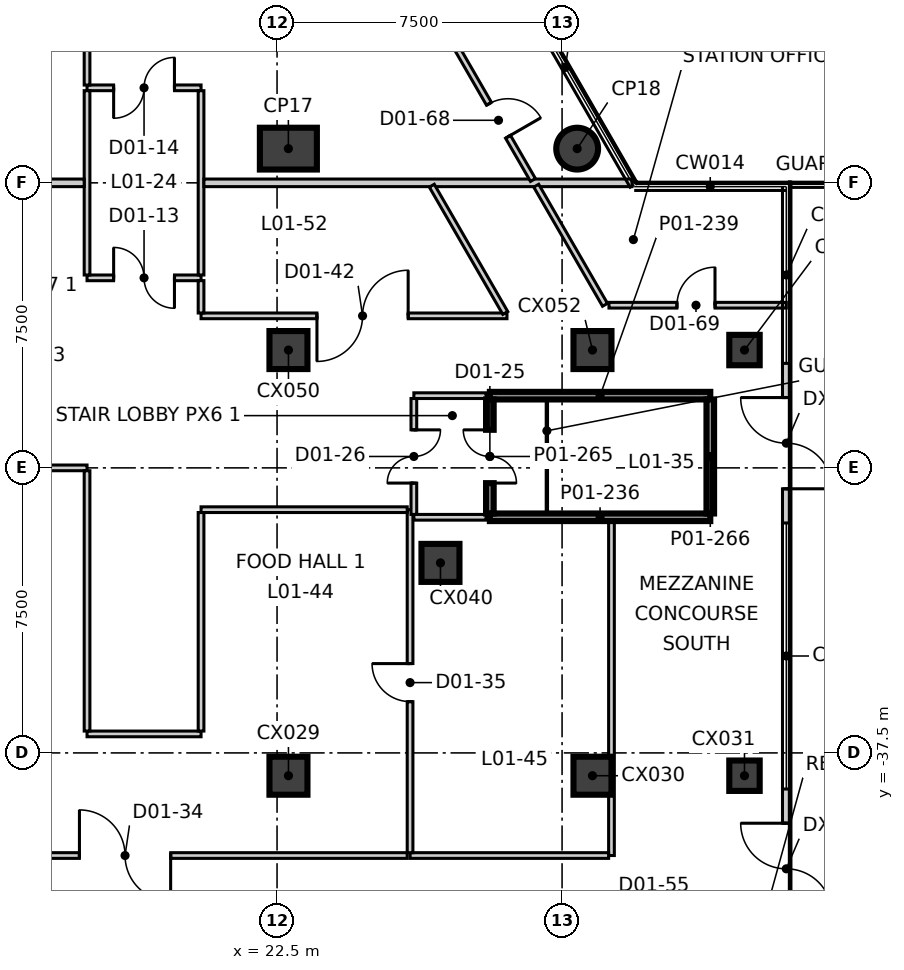
"""IFC4 building model, lengths in metres.
Left out: names, types, materials, properties, quantities, classifications, styles, units other than length and angle.
Written with IfcOpenShell. Run it as: python <this file> out.ifc"""

import sys

from ifc_helpers import new_model, si_unit, direction, frame, frame_2d, origin, origin_2d, place, context, subcontext, project, spatial, rectangle, circle, extrude, element, fill, save


model = new_model("IFC4")
c1 = context("Model", 3, precision=1e-05, world=origin(), true_north=direction((0.0, 1.0)))
c2 = subcontext(c1, "Body", "Model", "MODEL_VIEW")
j1 = project(units=[si_unit("LENGTHUNIT", "METRE"), si_unit("PLANEANGLEUNIT", "RADIAN")], contexts=[c1])
p1 = place(None, origin())
s1 = spatial("IfcSite", under=j1, at=p1, CompositionType="ELEMENT")
p2 = place(p1, origin())
s2 = spatial("IfcBuilding", under=s1, at=p2, CompositionType="ELEMENT")
p3 = place(p2, frame((0.0, 0.0, 8.5)))
s3 = spatial("IfcBuildingStorey", under=s2, at=p3, CompositionType="ELEMENT", Elevation=8.5)
p4 = place(p3, frame((22.798, -21.6, -0.4), z_axis=(0.0, 0.0, 1.0), x_axis=(1.0, 0.0, 0.0)))
e1 = element("IfcColumn", 1, at=p4, inside=s3, PredefinedType="COLUMN", context=c2, shape_type="SweptSolid", body=[
    extrude(rectangle(XDim=1.5, YDim=1.1, at=origin_2d()), origin(), (0.0, 0.0, 1.0), 6.0),
])
p5 = place(p3, frame((30.397, -21.6, -0.4), z_axis=(0.0, 0.0, 1.0), x_axis=(1.0, 0.0, 0.0)))
e2 = element("IfcColumn", 2, at=p5, inside=s3, PredefinedType="COLUMN", context=c2, shape_type="SweptSolid", body=[
    extrude(circle(Radius=0.55, at=origin_2d()), origin(), (0.0, 0.0, 1.0), 6.0),
])
for number, where, z_axis, x_axis in (
    (3, (22.8, -38.1, -0.4), (0.0, 0.0, 1.0), (1.0, 0.0, 0.0)),
    (4, (30.8, -38.1, -0.4), (0.0, 0.0, 1.0), (1.0, 0.0, 0.0)),
):
    element("IfcColumn", number, at=place(p3, frame(where, z_axis=z_axis, x_axis=x_axis)), inside=s3, PredefinedType="COLUMN", context=c2, shape_type="SweptSolid", body=[
        extrude(rectangle(XDim=1.0, YDim=1.0, at=origin_2d()), origin(), (0.0, 0.0, 1.0), 6.0),
    ])
p6 = place(p3, frame((34.8, -38.1, -0.4), z_axis=(0.0, 0.0, 1.0), x_axis=(1.0, 0.0, 0.0)))
e5 = element("IfcColumn", 5, at=p6, inside=s3, PredefinedType="COLUMN", context=c2, shape_type="SweptSolid", body=[
    extrude(rectangle(XDim=0.8, YDim=0.8, at=origin_2d()), origin(), (0.0, 0.0, 1.0), 6.0),
])
for number, where, z_axis, x_axis in (
    (6, (26.8, -32.5, -0.4), (0.0, 0.0, 1.0), (1.0, 0.0, 0.0)),
    (7, (22.8, -26.9, -0.4), (0.0, 0.0, 1.0), (1.0, 0.0, 0.0)),
    (8, (30.8, -26.9, -0.4), (0.0, 0.0, 1.0), (1.0, 0.0, 0.0)),
):
    element("IfcColumn", number, at=place(p3, frame(where, z_axis=z_axis, x_axis=x_axis)), inside=s3, PredefinedType="COLUMN", context=c2, shape_type="SweptSolid", body=[
        extrude(rectangle(XDim=1.0, YDim=1.0, at=origin_2d()), origin(), (0.0, 0.0, 1.0), 6.0),
    ])
p7 = place(p3, frame((34.8, -26.9, -0.4), z_axis=(0.0, 0.0, 1.0), x_axis=(1.0, 0.0, 0.0)))
e9 = element("IfcColumn", 9, at=p7, inside=s3, PredefinedType="COLUMN", context=c2, shape_type="SweptSolid", body=[
    extrude(rectangle(XDim=0.8, YDim=0.8, at=origin_2d()), origin(), (0.0, 0.0, 1.0), 6.0),
])
p8 = place(p3, frame((35.9, -42.65, 0.0), z_axis=(0.0, 0.0, 1.0), x_axis=(0.0, 1.0, 0.0)))
e10 = element("IfcWall", 10, at=p8, inside=s3, PredefinedType="ELEMENTEDWALL", context=c2, shape_type="SweptSolid", body=[
    extrude(rectangle(XDim=4.2, YDim=0.2, at=frame_2d((2.1, 0.0))), origin(), (0.0, 0.0, 1.0), 5.6),
])
p9 = place(p8, frame((0.9, 0.0, 0.0)))
e11 = element("IfcOpeningElement", 11, at=p9, cuts=e10, PredefinedType="OPENING", context=c2, shape_type="SweptSolid", body=[
    extrude(rectangle(XDim=2.4, YDim=2.4, at=frame_2d((1.2, 1.2))), frame((0.0, 0.11, 0.0), z_axis=(0.0, -1.0, 0.0), x_axis=(1.0, 0.0, 0.0)), (0.0, 0.0, 1.0), 0.22),
])
p10 = place(p3, frame((35.9, -31.45, 0.0), z_axis=(0.0, 0.0, 1.0), x_axis=(0.0, 1.0, 0.0)))
e12 = element("IfcWall", 12, at=p10, inside=s3, PredefinedType="ELEMENTEDWALL", context=c2, shape_type="SweptSolid", body=[
    extrude(rectangle(XDim=4.2, YDim=0.2, at=frame_2d((2.1, 0.0))), origin(), (0.0, 0.0, 1.0), 5.6),
])
p11 = place(p10, frame((0.9, 0.0, 0.0)))
e13 = element("IfcOpeningElement", 13, at=p11, cuts=e12, PredefinedType="OPENING", context=c2, shape_type="SweptSolid", body=[
    extrude(rectangle(XDim=2.4, YDim=2.4, at=frame_2d((1.2, 1.2))), frame((0.0, 0.11, 0.0), z_axis=(0.0, -1.0, 0.0), x_axis=(1.0, 0.0, 0.0)), (0.0, 0.0, 1.0), 0.22),
])
for number, where, z_axis, x_axis in (
    (14, (26.1, -28.1, 0.0), (0.0, 0.0, 1.0), (1.0, 0.0, 0.0)),
    (15, (26.1, -31.3, 0.0), (0.0, 0.0, 1.0), (1.0, 0.0, 0.0)),
):
    element("IfcWall", number, at=place(p3, frame(where, z_axis=z_axis, x_axis=x_axis)), inside=s3, PredefinedType="PARTITIONING", context=c2, shape_type="SweptSolid", body=[
        extrude(rectangle(XDim=1.9, YDim=0.15, at=frame_2d((0.95, 0.0))), origin(), (0.0, 0.0, 1.0), 5.6),
    ])
p12 = place(p3, frame((31.3, -40.2, 0.0), z_axis=(0.0, 0.0, 1.0), x_axis=(0.0, 1.0, 0.0)))
e16 = element("IfcWall", 16, at=p12, inside=s3, PredefinedType="PARTITIONING", context=c2, shape_type="SweptSolid", body=[
    extrude(rectangle(XDim=8.8, YDim=0.15, at=frame_2d((4.4, 0.0))), origin(), (0.0, 0.0, 1.0), 5.6),
])
p13 = place(p3, frame((26.0, -40.2, 0.0), z_axis=(0.0, 0.0, 1.0), x_axis=(1.0, 0.0, 0.0)))
e17 = element("IfcWall", 17, at=p13, inside=s3, PredefinedType="PARTITIONING", context=c2, shape_type="SweptSolid", body=[
    extrude(rectangle(XDim=5.225, YDim=0.15, at=frame_2d((2.613, 0.0))), origin(), (0.0, 0.0, 1.0), 5.6),
])
p14 = place(p3, frame((26.0, -40.125, 0.0), z_axis=(0.0, 0.0, 1.0), x_axis=(0.0, 1.0, 0.0)))
e18 = element("IfcWall", 18, at=p14, inside=s3, PredefinedType="PARTITIONING", context=c2, shape_type="SweptSolid", body=[
    extrude(rectangle(XDim=9.025, YDim=0.15, at=frame_2d((4.512, 0.0))), origin(), (0.0, 0.0, 1.0), 5.6),
])
p15 = place(p14, frame((3.975, 0.0, 0.0)))
e19 = element("IfcOpeningElement", 19, at=p15, cuts=e18, PredefinedType="OPENING", context=c2, shape_type="SweptSolid", body=[
    extrude(rectangle(XDim=1.0, YDim=2.1, at=frame_2d((0.5, 1.05))), frame((0.0, 0.085, 0.0), z_axis=(0.0, -1.0, 0.0), x_axis=(1.0, 0.0, 0.0)), (0.0, 0.0, 1.0), 0.17),
])
p16 = place(p3, frame((26.1, -31.225, 0.0), z_axis=(0.0, 0.0, 1.0), x_axis=(0.0, 1.0, 0.0)))
e20 = element("IfcWall", 20, at=p16, inside=s3, PredefinedType="PARTITIONING", context=c2, shape_type="SweptSolid", body=[
    extrude(rectangle(XDim=3.05, YDim=0.15, at=frame_2d((1.525, 0.0))), origin(), (0.0, 0.0, 1.0), 5.6),
])
p17 = place(p16, frame((0.825, 0.0, 0.0)))
e21 = element("IfcOpeningElement", 21, at=p17, cuts=e20, PredefinedType="OPENING", context=c2, shape_type="SweptSolid", body=[
    extrude(rectangle(XDim=1.4, YDim=2.1, at=frame_2d((0.7, 1.05))), frame((0.0, 0.085, 0.0), z_axis=(0.0, -1.0, 0.0), x_axis=(1.0, 0.0, 0.0)), (0.0, 0.0, 1.0), 0.17),
])
p18 = place(p3, frame((17.5, -20.0, 0.0), z_axis=(0.0, 0.0, 1.0), x_axis=(1.0, 0.0, 0.0)))
e22 = element("IfcWall", 22, at=p18, inside=s3, PredefinedType="PARTITIONING", context=c2, shape_type="SweptSolid", body=[
    extrude(rectangle(XDim=3.0, YDim=0.15, at=frame_2d((1.5, 0.0))), origin(), (0.0, 0.0, 1.0), 5.6),
])
p19 = place(p18, frame((0.7, 0.0, 0.0)))
e23 = element("IfcOpeningElement", 23, at=p19, cuts=e22, PredefinedType="OPENING", context=c2, shape_type="SweptSolid", body=[
    extrude(rectangle(XDim=1.6, YDim=2.1, at=frame_2d((0.8, 1.05))), frame((0.0, 0.085, 0.0), z_axis=(0.0, -1.0, 0.0), x_axis=(1.0, 0.0, 0.0)), (0.0, 0.0, 1.0), 0.17),
])
p20 = place(p3, frame((17.5, -25.0, 0.0), z_axis=(0.0, 0.0, 1.0), x_axis=(1.0, 0.0, 0.0)))
e24 = element("IfcWall", 24, at=p20, inside=s3, PredefinedType="PARTITIONING", context=c2, shape_type="SweptSolid", body=[
    extrude(rectangle(XDim=3.0, YDim=0.15, at=frame_2d((1.5, 0.0))), origin(), (0.0, 0.0, 1.0), 5.6),
])
p21 = place(p20, frame((0.7, 0.0, 0.0)))
e25 = element("IfcOpeningElement", 25, at=p21, cuts=e24, PredefinedType="OPENING", context=c2, shape_type="SweptSolid", body=[
    extrude(rectangle(XDim=1.6, YDim=2.1, at=frame_2d((0.8, 1.05))), frame((0.0, 0.085, 0.0), z_axis=(0.0, -1.0, 0.0), x_axis=(1.0, 0.0, 0.0)), (0.0, 0.0, 1.0), 0.17),
])
for number, where, z_axis, x_axis in (
    (26, (17.5, -24.925, 0.0), (0.0, 0.0, 1.0), (0.0, 1.0, 0.0)),
    (27, (20.5, -24.925, 0.0), (0.0, 0.0, 1.0), (0.0, 1.0, 0.0)),
):
    element("IfcWall", number, at=place(p3, frame(where, z_axis=z_axis, x_axis=x_axis)), inside=s3, PredefinedType="PARTITIONING", context=c2, shape_type="SweptSolid", body=[
        extrude(rectangle(XDim=4.85, YDim=0.15, at=frame_2d((2.425, 0.0))), origin(), (0.0, 0.0, 1.0), 5.6),
    ])
p22 = place(p3, frame((-17.425, -22.5, 0.0), z_axis=(0.0, 0.0, 1.0), x_axis=(1.0, 0.0, 0.0)))
e28 = element("IfcWall", 28, at=p22, inside=s3, PredefinedType="SOLIDWALL", context=c2, shape_type="SweptSolid", body=[
    extrude(rectangle(XDim=34.85, YDim=0.2, at=frame_2d((17.425, 0.0))), origin(), (0.0, 0.0, 1.0), 5.6),
])
p23 = place(p3, frame((20.575, -22.5, 0.0), z_axis=(0.0, 0.0, 1.0), x_axis=(1.0, 0.0, 0.0)))
e29 = element("IfcWall", 29, at=p23, inside=s3, PredefinedType="SOLIDWALL", context=c2, shape_type="SweptSolid", body=[
    extrude(rectangle(XDim=11.266, YDim=0.2, at=frame_2d((5.633, 0.0))), origin(), (0.0, 0.0, 1.0), 5.6),
])
p24 = place(p3, frame((11.0, -40.2, 0.0), z_axis=(0.0, 0.0, 1.0), x_axis=(1.0, 0.0, 0.0)))
e30 = element("IfcWall", 30, at=p24, inside=s3, PredefinedType="PARTITIONING", context=c2, shape_type="SweptSolid", body=[
    extrude(rectangle(XDim=14.925, YDim=0.15, at=frame_2d((7.462, 0.0))), origin(), (0.0, 0.0, 1.0), 5.6),
])
p25 = place(p24, frame((6.3, 0.0, 0.0)))
e31 = element("IfcOpeningElement", 31, at=p25, cuts=e30, PredefinedType="OPENING", context=c2, shape_type="SweptSolid", body=[
    extrude(rectangle(XDim=2.4, YDim=2.1, at=frame_2d((1.2, 1.05))), frame((0.0, 0.085, 0.0), z_axis=(0.0, -1.0, 0.0), x_axis=(1.0, 0.0, 0.0)), (0.0, 0.0, 1.0), 0.17),
])
p26 = place(p3, frame((20.5, -26.0, 0.0), z_axis=(0.0, 0.0, 1.0), x_axis=(1.0, 0.0, 0.0)))
e32 = element("IfcWall", 32, at=p26, inside=s3, PredefinedType="PARTITIONING", context=c2, shape_type="SweptSolid", body=[
    extrude(rectangle(XDim=8.05, YDim=0.15, at=frame_2d((4.025, 0.0))), origin(), (0.0, 0.0, 1.0), 5.6),
])
p27 = place(p26, frame((3.05, 0.0, 0.0)))
e33 = element("IfcOpeningElement", 33, at=p27, cuts=e32, PredefinedType="OPENING", context=c2, shape_type="SweptSolid", body=[
    extrude(rectangle(XDim=2.4, YDim=2.1, at=frame_2d((1.2, 1.05))), frame((0.0, 0.085, 0.0), z_axis=(0.0, -1.0, 0.0), x_axis=(1.0, 0.0, 0.0)), (0.0, 0.0, 1.0), 0.17),
])
p28 = place(p3, frame((20.5, -31.1, 0.0), z_axis=(0.0, 0.0, 1.0), x_axis=(1.0, 0.0, 0.0)))
e34 = element("IfcWall", 34, at=p28, inside=s3, PredefinedType="PARTITIONING", context=c2, shape_type="SweptSolid", body=[
    extrude(rectangle(XDim=5.425, YDim=0.15, at=frame_2d((2.712, 0.0))), origin(), (0.0, 0.0, 1.0), 5.6),
])
p29 = place(p3, frame((17.5, -37.0, 0.0), z_axis=(0.0, 0.0, 1.0), x_axis=(1.0, 0.0, 0.0)))
e35 = element("IfcWall", 35, at=p29, inside=s3, PredefinedType="PARTITIONING", context=c2, shape_type="SweptSolid", body=[
    extrude(rectangle(XDim=3.0, YDim=0.15, at=frame_2d((1.5, 0.0))), origin(), (0.0, 0.0, 1.0), 5.6),
])
p30 = place(p3, frame((11.0, -30.0, 0.0), z_axis=(0.0, 0.0, 1.0), x_axis=(1.0, 0.0, 0.0)))
e36 = element("IfcWall", 36, at=p30, inside=s3, PredefinedType="PARTITIONING", context=c2, shape_type="SweptSolid", body=[
    extrude(rectangle(XDim=6.5, YDim=0.15, at=frame_2d((3.25, 0.0))), origin(), (0.0, 0.0, 1.0), 5.6),
])
p31 = place(p3, frame((17.5, -36.925, 0.0), z_axis=(0.0, 0.0, 1.0), x_axis=(0.0, 1.0, 0.0)))
e37 = element("IfcWall", 37, at=p31, inside=s3, PredefinedType="PARTITIONING", context=c2, shape_type="SweptSolid", body=[
    extrude(rectangle(XDim=6.85, YDim=0.15, at=frame_2d((3.425, 0.0))), origin(), (0.0, 0.0, 1.0), 5.6),
])
p32 = place(p3, frame((17.5, -19.927, 0.0), z_axis=(0.0, 0.0, 1.0), x_axis=(0.0, 1.0, 0.0)))
e38 = element("IfcWall", 38, at=p32, inside=s3, PredefinedType="PARTITIONING", context=c2, shape_type="SweptSolid", body=[
    extrude(rectangle(XDim=1.727, YDim=0.15, at=frame_2d((0.864, 0.0))), origin(), (0.0, 0.0, 1.0), 5.6),
])
p33 = place(p3, frame((20.5, -36.925, 0.0), z_axis=(0.0, 0.0, 1.0), x_axis=(0.0, 1.0, 0.0)))
e39 = element("IfcWall", 39, at=p33, inside=s3, PredefinedType="PARTITIONING", context=c2, shape_type="SweptSolid", body=[
    extrude(rectangle(XDim=5.75, YDim=0.15, at=frame_2d((2.875, 0.0))), origin(), (0.0, 0.0, 1.0), 5.6),
])
p34 = place(p3, frame((20.5, -25.925, 0.0), z_axis=(0.0, 0.0, 1.0), x_axis=(0.0, 1.0, 0.0)))
e40 = element("IfcWall", 40, at=p34, inside=s3, PredefinedType="PARTITIONING", context=c2, shape_type="SweptSolid", body=[
    extrude(rectangle(XDim=0.852, YDim=0.15, at=frame_2d((0.426, 0.0))), origin(), (0.0, 0.0, 1.0), 5.6),
])
p35 = place(p3, frame((26.572, -22.575, 0.0), z_axis=(0.0, 0.0, 1.0), x_axis=(0.499981047344, -0.866036345829, 0.0)))
e41 = element("IfcWall", 41, at=p35, inside=s3, PredefinedType="PARTITIONING", context=c2, shape_type="SweptSolid", body=[
    extrude(rectangle(XDim=3.868, YDim=0.15, at=frame_2d((1.934, 0.0))), origin(), (0.0, 0.0, 1.0), 5.6),
])
p36 = place(p3, frame((24.491, -14.21, 0.0), z_axis=(0.0, 0.0, 1.0), x_axis=(0.499994996542, -0.866028292513, 0.0)))
e42 = element("IfcWall", 42, at=p36, inside=s3, PredefinedType="PARTITIONING", context=c2, shape_type="SweptSolid", body=[
    extrude(rectangle(XDim=9.486, YDim=0.15, at=frame_2d((4.743, 0.0))), origin(), (0.0, 0.0, 1.0), 5.6),
])
p37 = place(p36, frame((7.172, 0.0, 0.0)))
e43 = element("IfcOpeningElement", 43, at=p37, cuts=e42, PredefinedType="OPENING", context=c2, shape_type="SweptSolid", body=[
    extrude(rectangle(XDim=1.0, YDim=2.1, at=frame_2d((0.5, 1.05))), frame((0.0, 0.085, 0.0), z_axis=(0.0, -1.0, 0.0), x_axis=(1.0, 0.0, 0.0)), (0.0, 0.0, 1.0), 0.17),
])
p38 = place(p3, frame((29.32, -22.575, 0.0), z_axis=(0.0, 0.0, 1.0), x_axis=(0.499961819171, -0.866047446374, 0.0)))
e44 = element("IfcWall", 44, at=p38, inside=s3, PredefinedType="PARTITIONING", context=c2, shape_type="SweptSolid", body=[
    extrude(rectangle(XDim=3.62, YDim=0.15, at=frame_2d((1.81, 0.0))), origin(), (0.0, 0.0, 1.0), 5.6),
])
p39 = place(p3, frame((31.234, -25.72, 0.0), z_axis=(0.0, 0.0, 1.0), x_axis=(1.0, 0.0, 0.0)))
e45 = element("IfcWall", 45, at=p39, inside=s3, PredefinedType="PARTITIONING", context=c2, shape_type="SweptSolid", body=[
    extrude(rectangle(XDim=4.666, YDim=0.15, at=frame_2d((2.333, 0.0))), origin(), (0.0, 0.0, 1.0), 5.6),
])
p40 = place(p39, frame((1.79, 0.0, 0.0)))
e46 = element("IfcOpeningElement", 46, at=p40, cuts=e45, PredefinedType="OPENING", context=c2, shape_type="SweptSolid", body=[
    extrude(rectangle(XDim=1.0, YDim=2.1, at=frame_2d((0.5, 1.05))), frame((0.0, 0.085, 0.0), z_axis=(0.0, -1.0, 0.0), x_axis=(1.0, 0.0, 0.0)), (0.0, 0.0, 1.0), 0.17),
])
for number, where, z_axis, x_axis in (
    (47, (28.1, -31.3, 0.0), (0.0, 0.0, 1.0), (1.0, 0.0, 0.0)),
    (48, (28.1, -28.1, 0.0), (0.0, 0.0, 1.0), (1.0, 0.0, 0.0)),
):
    element("IfcWall", number, at=place(p3, frame(where, z_axis=z_axis, x_axis=x_axis)), inside=s3, PredefinedType="SOLIDWALL", context=c2, shape_type="SweptSolid", body=[
        extrude(rectangle(XDim=5.8, YDim=0.2, at=frame_2d((2.9, 0.0))), origin(), (0.0, 0.0, 1.0), 5.6),
    ])
p41 = place(p3, frame((28.1, -31.2, 0.0), z_axis=(0.0, 0.0, 1.0), x_axis=(0.0, 1.0, 0.0)))
e49 = element("IfcWall", 49, at=p41, inside=s3, PredefinedType="SOLIDWALL", context=c2, shape_type="SweptSolid", body=[
    extrude(rectangle(XDim=3.0, YDim=0.2, at=frame_2d((1.5, 0.0))), origin(), (0.0, 0.0, 1.0), 5.6),
])
p42 = place(p41, frame((0.8, 0.0, 0.0)))
e50 = element("IfcOpeningElement", 50, at=p42, cuts=e49, PredefinedType="OPENING", context=c2, shape_type="SweptSolid", body=[
    extrude(rectangle(XDim=1.4, YDim=2.1, at=frame_2d((0.7, 1.05))), frame((0.0, 0.11, 0.0), z_axis=(0.0, -1.0, 0.0), x_axis=(1.0, 0.0, 0.0)), (0.0, 0.0, 1.0), 0.22),
])
p43 = place(p3, frame((33.9, -31.2, 0.0), z_axis=(0.0, 0.0, 1.0), x_axis=(0.0, 1.0, 0.0)))
e51 = element("IfcWall", 51, at=p43, inside=s3, PredefinedType="SOLIDWALL", context=c2, shape_type="SweptSolid", body=[
    extrude(rectangle(XDim=3.0, YDim=0.2, at=frame_2d((1.5, 0.0))), origin(), (0.0, 0.0, 1.0), 5.6),
])
p44 = place(p9, frame((2.4, 0.0, 0.0), z_axis=(0.0, 0.0, 1.0), x_axis=(-1.0, 0.0, 0.0)))
e52 = element("IfcDoor", 52, at=p44, inside=s3, OperationType="DOUBLE_DOOR_SINGLE_SWING", PredefinedType="DOOR", context=c2, shape_type="SweptSolid", body=[
    extrude(rectangle(XDim=2.4, YDim=2.4, at=frame_2d((1.2, 1.2))), frame((0.0, 0.025, 0.0), z_axis=(0.0, -1.0, 0.0), x_axis=(1.0, 0.0, 0.0)), (0.0, 0.0, 1.0), 0.05),
])
fill(e11, e52)
p45 = place(p11, frame((2.4, 0.0, 0.0), z_axis=(0.0, 0.0, 1.0), x_axis=(-1.0, 0.0, 0.0)))
e53 = element("IfcDoor", 53, at=p45, inside=s3, OperationType="DOUBLE_DOOR_SINGLE_SWING", PredefinedType="DOOR", context=c2, shape_type="SweptSolid", body=[
    extrude(rectangle(XDim=2.4, YDim=2.4, at=frame_2d((1.2, 1.2))), frame((0.0, 0.025, 0.0), z_axis=(0.0, -1.0, 0.0), x_axis=(1.0, 0.0, 0.0)), (0.0, 0.0, 1.0), 0.05),
])
fill(e13, e53)
p46 = place(p21, origin())
e54 = element("IfcDoor", 54, at=p46, inside=s3, OperationType="DOUBLE_DOOR_SINGLE_SWING", PredefinedType="DOOR", context=c2, shape_type="SweptSolid", body=[
    extrude(rectangle(XDim=1.6, YDim=2.1, at=frame_2d((0.8, 1.05))), frame((0.0, 0.025, 0.0), z_axis=(0.0, -1.0, 0.0), x_axis=(1.0, 0.0, 0.0)), (0.0, 0.0, 1.0), 0.05),
])
fill(e25, e54)
p47 = place(p19, origin())
e55 = element("IfcDoor", 55, at=p47, inside=s3, OperationType="DOUBLE_DOOR_SINGLE_SWING", PredefinedType="DOOR", context=c2, shape_type="SweptSolid", body=[
    extrude(rectangle(XDim=1.6, YDim=2.1, at=frame_2d((0.8, 1.05))), frame((0.0, 0.025, 0.0), z_axis=(0.0, -1.0, 0.0), x_axis=(1.0, 0.0, 0.0)), (0.0, 0.0, 1.0), 0.05),
])
fill(e23, e55)
p48 = place(p42, origin())
e56 = element("IfcDoor", 56, at=p48, inside=s3, OperationType="DOUBLE_DOOR_SINGLE_SWING", PredefinedType="DOOR", context=c2, shape_type="SweptSolid", body=[
    extrude(rectangle(XDim=1.4, YDim=2.1, at=frame_2d((0.7, 1.05))), frame((0.0, 0.025, 0.0), z_axis=(0.0, -1.0, 0.0), x_axis=(1.0, 0.0, 0.0)), (0.0, 0.0, 1.0), 0.05),
])
fill(e50, e56)
p49 = place(p17, origin())
e57 = element("IfcDoor", 57, at=p49, inside=s3, OperationType="DOUBLE_DOOR_SINGLE_SWING", PredefinedType="DOOR", context=c2, shape_type="SweptSolid", body=[
    extrude(rectangle(XDim=1.4, YDim=2.1, at=frame_2d((0.7, 1.05))), frame((0.0, 0.025, 0.0), z_axis=(0.0, -1.0, 0.0), x_axis=(1.0, 0.0, 0.0)), (0.0, 0.0, 1.0), 0.05),
])
fill(e21, e57)
p50 = place(p25, origin())
e58 = element("IfcDoor", 58, at=p50, inside=s3, OperationType="DOUBLE_DOOR_SINGLE_SWING", PredefinedType="DOOR", context=c2, shape_type="SweptSolid", body=[
    extrude(rectangle(XDim=2.4, YDim=2.1, at=frame_2d((1.2, 1.05))), frame((0.0, 0.025, 0.0), z_axis=(0.0, -1.0, 0.0), x_axis=(1.0, 0.0, 0.0)), (0.0, 0.0, 1.0), 0.05),
])
fill(e31, e58)
p51 = place(p15, origin())
e59 = element("IfcDoor", 59, at=p51, inside=s3, OperationType="SINGLE_SWING_LEFT", PredefinedType="DOOR", context=c2, shape_type="SweptSolid", body=[
    extrude(rectangle(XDim=1.0, YDim=2.1, at=frame_2d((0.5, 1.05))), frame((0.0, 0.025, 0.0), z_axis=(0.0, -1.0, 0.0), x_axis=(1.0, 0.0, 0.0)), (0.0, 0.0, 1.0), 0.05),
])
fill(e19, e59)
p52 = place(p27, origin())
e60 = element("IfcDoor", 60, at=p52, inside=s3, OperationType="DOUBLE_DOOR_SINGLE_SWING", PredefinedType="DOOR", context=c2, shape_type="SweptSolid", body=[
    extrude(rectangle(XDim=2.4, YDim=2.1, at=frame_2d((1.2, 1.05))), frame((0.0, 0.025, 0.0), z_axis=(0.0, -1.0, 0.0), x_axis=(1.0, 0.0, 0.0)), (0.0, 0.0, 1.0), 0.05),
])
fill(e33, e60)
p53 = place(p37, origin())
e61 = element("IfcDoor", 61, at=p53, inside=s3, OperationType="SINGLE_SWING_LEFT", PredefinedType="DOOR", context=c2, shape_type="SweptSolid", body=[
    extrude(rectangle(XDim=1.0, YDim=2.1, at=frame_2d((0.5, 1.05))), frame((0.0, 0.025, 0.0), z_axis=(0.0, -1.0, 0.0), x_axis=(1.0, 0.0, 0.0)), (0.0, 0.0, 1.0), 0.05),
])
fill(e43, e61)
p54 = place(p40, origin())
e62 = element("IfcDoor", 62, at=p54, inside=s3, OperationType="SINGLE_SWING_LEFT", PredefinedType="DOOR", context=c2, shape_type="SweptSolid", body=[
    extrude(rectangle(XDim=1.0, YDim=2.1, at=frame_2d((0.5, 1.05))), frame((0.0, 0.025, 0.0), z_axis=(0.0, -1.0, 0.0), x_axis=(1.0, 0.0, 0.0)), (0.0, 0.0, 1.0), 0.05),
])
fill(e46, e62)
save(model, sys.argv[1])
